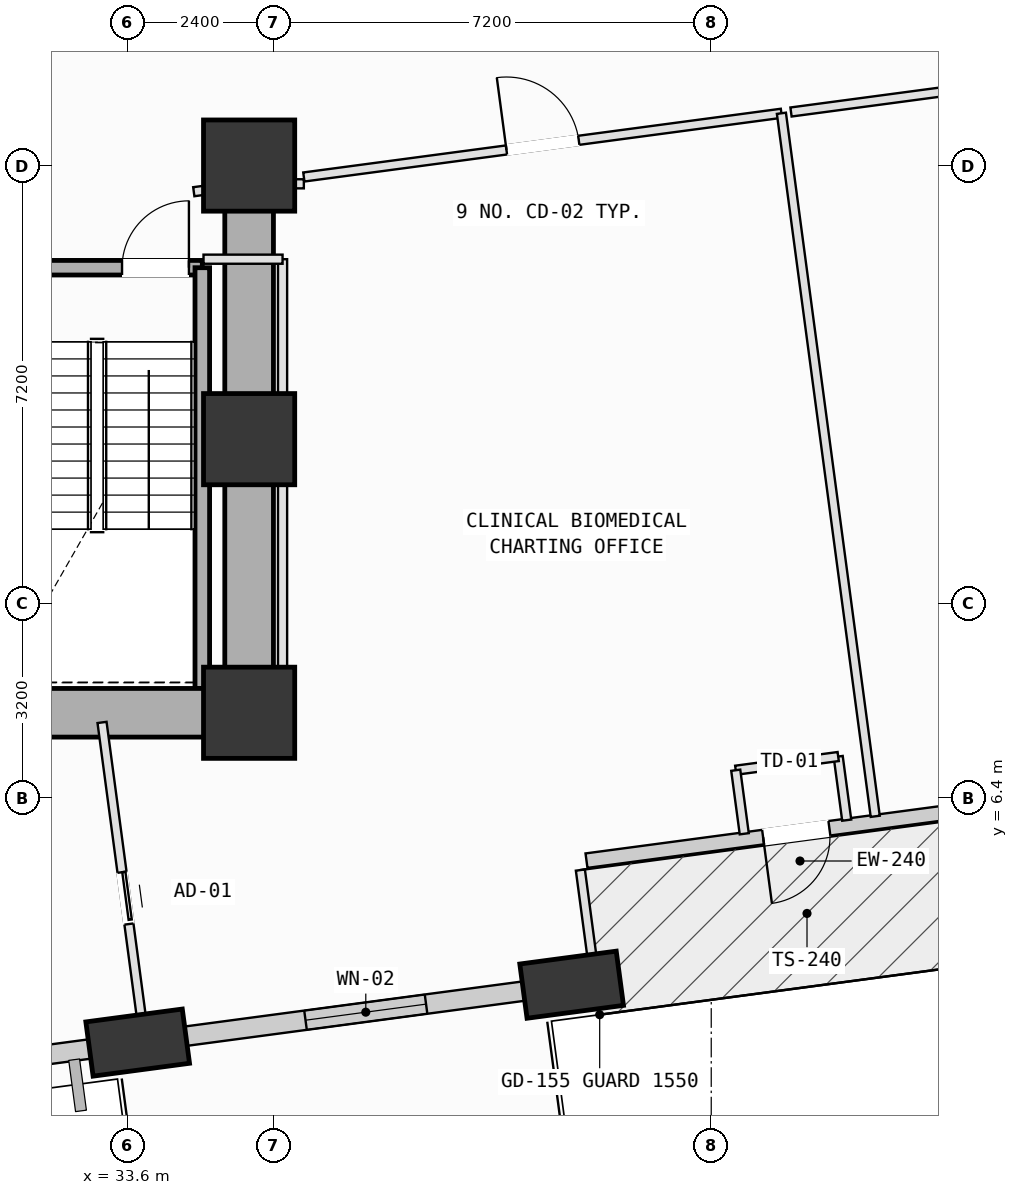
"""IFC4 building model, lengths in metres.
Left out: names, types, materials, properties, quantities, classifications, styles, units other than length and angle.
Written with IfcOpenShell. Run it as: python <this file> out.ifc"""

import sys

from ifc_helpers import new_model, si_unit, direction, frame, frame_2d, origin, origin_2d, place, context, subcontext, project, spatial, rectangle, extrude, element, fill, save


model = new_model("IFC4")
c1 = context("Model", 3, precision=1e-05, world=origin(), true_north=direction((0.0, 1.0)))
c2 = subcontext(c1, "Body", "Model", "MODEL_VIEW")
j1 = project(units=[si_unit("LENGTHUNIT", "METRE"), si_unit("PLANEANGLEUNIT", "RADIAN")], contexts=[c1])
p1 = place(None, origin())
s1 = spatial("IfcSite", under=j1, at=p1, CompositionType="ELEMENT")
p2 = place(p1, origin())
s2 = spatial("IfcBuilding", under=s1, at=p2, CompositionType="ELEMENT")
p3 = place(p2, frame((0.0, 0.0, 55.0)))
s3 = spatial("IfcBuildingStorey", under=s2, at=p3, CompositionType="ELEMENT", Elevation=55.0)
for number, where, z_axis, x_axis in (
    (1, (35.6, 7.8, 0.0), (0.0, 0.0, 1.0), (1.0, 0.0, 0.0)),
    (2, (35.6, 12.3, 0.0), (0.0, 0.0, 1.0), (1.0, 0.0, 0.0)),
    (3, (35.6, 16.8, 0.0), (0.0, 0.0, 1.0), (1.0, 0.0, 0.0)),
):
    element("IfcColumn", number, at=place(p3, frame(where, z_axis=z_axis, x_axis=x_axis)), inside=s3, PredefinedType="COLUMN", context=c2, shape_type="SweptSolid", body=[
        extrude(rectangle(XDim=1.5, YDim=1.5, at=origin_2d()), origin(), (0.0, 0.0, 1.0), 4.0),
    ])
p4 = place(p3, frame((33.768, 2.375, 0.002), z_axis=(0.092515284398, 0.001459807249, 0.995710194341), x_axis=(-0.147311180333, 0.989014492108, 0.012237260689)))
e4 = element("IfcColumn", 4, at=p4, inside=s3, PredefinedType="COLUMN", context=c2, shape_type="SweptSolid", body=[
    extrude(rectangle(XDim=1.6, YDim=0.9, at=origin_2d()), origin(), (0.0, 0.0, 1.0), 4.014),
])
p5 = place(p3, frame((40.904, 3.327, 0.002), z_axis=(0.088309786879, 0.030896261525, 0.995613781828), x_axis=(-0.451622763535, 0.892123181344, 0.012373712677)))
e5 = element("IfcColumn", 5, at=p5, inside=s3, PredefinedType="COLUMN", context=c2, shape_type="SweptSolid", body=[
    extrude(rectangle(XDim=1.6, YDim=0.9, at=origin_2d()), origin(), (0.0, 0.0, 1.0), 4.014),
])
p6 = place(p3, frame((48.047, 6.288, 0.0), z_axis=(0.0, 0.0, 1.0), x_axis=(-0.991216868142, -0.132246437799, 0.0)))
e6 = element("IfcWall", 6, at=p6, inside=s3, PredefinedType="SOLIDWALL", context=c2, shape_type="SweptSolid", body=[
    extrude(rectangle(XDim=6.96, YDim=0.24, at=frame_2d((3.48, 0.0))), origin(), (0.0, 0.0, 1.0), 3.165),
])
p7 = place(p6, frame((2.93, 0.0, 0.0)))
e7 = element("IfcOpeningElement", 7, at=p7, cuts=e6, PredefinedType="OPENING", context=c2, shape_type="SweptSolid", body=[
    extrude(rectangle(XDim=1.1, YDim=2.15, at=frame_2d((0.55, 1.075))), frame((0.0, 0.13, 0.0), z_axis=(0.0, -1.0, 0.0), x_axis=(1.0, 0.0, 0.0)), (0.0, 0.0, 1.0), 0.26),
])
p8 = place(p3, frame((33.348, 2.319, 0.0), z_axis=(0.0, 0.0, 1.0), x_axis=(-0.991219354878, -0.132227797813, 0.0)))
e8 = element("IfcWall", 8, at=p8, inside=s3, PredefinedType="SOLIDWALL", context=c2, shape_type="SweptSolid", body=[
    extrude(rectangle(XDim=5.99, YDim=0.32, at=frame_2d((2.995, 0.0))), origin(), (0.0, 0.0, 1.0), 3.165),
])
p9 = place(p8, frame((2.194, 0.0, 0.75)))
e9 = element("IfcOpeningElement", 9, at=p9, cuts=e8, PredefinedType="OPENING", context=c2, shape_type="SweptSolid", body=[
    extrude(rectangle(XDim=1.6, YDim=1.95, at=frame_2d((0.8, 0.975))), frame((0.0, 0.17, 0.0), z_axis=(0.0, -1.0, 0.0), x_axis=(1.0, 0.0, 0.0)), (0.0, 0.0, 1.0), 0.34),
])
p10 = place(p3, frame((40.485, 3.271, 0.0), z_axis=(0.0, 0.0, 1.0), x_axis=(-0.991217209888, -0.132243876315, 0.0)))
e10 = element("IfcWall", 10, at=p10, inside=s3, PredefinedType="SOLIDWALL", context=c2, shape_type="SweptSolid", body=[
    extrude(rectangle(XDim=5.985, YDim=0.32, at=frame_2d((2.993, 0.0))), origin(), (0.0, 0.0, 1.0), 3.165),
])
p11 = place(p10, frame((1.993, 0.0, 0.75)))
e11 = element("IfcOpeningElement", 11, at=p11, cuts=e10, PredefinedType="OPENING", context=c2, shape_type="SweptSolid", body=[
    extrude(rectangle(XDim=2.0, YDim=1.95, at=frame_2d((1.0, 0.975))), frame((0.0, 0.17, 0.0), z_axis=(0.0, -1.0, 0.0), x_axis=(1.0, 0.0, 0.0)), (0.0, 0.0, 1.0), 0.34),
])
p12 = place(p3, frame((31.37, 15.12, 0.0), z_axis=(0.0, 0.0, 1.0), x_axis=(1.0, 0.0, 0.0)))
e12 = element("IfcWall", 12, at=p12, inside=s3, PredefinedType="SOLIDWALL", context=c2, shape_type="SweptSolid", body=[
    extrude(rectangle(XDim=3.46, YDim=0.24, at=frame_2d((1.73, 0.0))), origin(), (0.0, 0.0, 1.0), 3.78),
])
p13 = place(p12, frame((2.14, 0.0, 0.0)))
e13 = element("IfcOpeningElement", 13, at=p13, cuts=e12, PredefinedType="OPENING", context=c2, shape_type="SweptSolid", body=[
    extrude(rectangle(XDim=1.1, YDim=2.15, at=frame_2d((0.55, 1.075))), frame((0.0, 0.13, 0.0), z_axis=(0.0, -1.0, 0.0), x_axis=(1.0, 0.0, 0.0)), (0.0, 0.0, 1.0), 0.26),
])
p14 = place(p3, frame((34.83, 15.12, 0.0), z_axis=(0.0, 0.0, 1.0), x_axis=(0.0, -1.0, 0.0)))
e14 = element("IfcWall", 14, at=p14, inside=s3, PredefinedType="SOLIDWALL", context=c2, shape_type="SweptSolid", body=[
    extrude(rectangle(XDim=6.92, YDim=0.24, at=frame_2d((3.46, 0.0))), origin(), (0.0, 0.0, 1.0), 3.78),
])
p15 = place(p3, frame((24.8, 7.8, 0.0), z_axis=(0.0, 0.0, 1.0), x_axis=(1.0, 0.0, 0.0)))
e15 = element("IfcWall", 15, at=p15, inside=s3, PredefinedType="SHEAR", context=c2, shape_type="SweptSolid", body=[
    extrude(rectangle(XDim=10.8, YDim=0.8, at=frame_2d((5.4, 0.0))), origin(), (0.0, 0.0, 1.0), 3.78),
])
p16 = place(p3, frame((35.6, 7.8, 0.0), z_axis=(0.0, 0.0, 1.0), x_axis=(0.0, 1.0, 0.0)))
e16 = element("IfcWall", 16, at=p16, inside=s3, PredefinedType="SHEAR", context=c2, shape_type="SweptSolid", body=[
    extrude(rectangle(XDim=9.0, YDim=0.8, at=frame_2d((4.5, 0.0))), origin(), (0.0, 0.0, 1.0), 3.78),
])
p17 = place(p3, frame((33.912, 2.162, 0.0), z_axis=(0.0, 0.0, 1.0), x_axis=(-0.991239788313, -0.132074532234, 0.0)))
e17 = element("IfcWall", 17, at=p17, inside=s3, PredefinedType="PARTITIONING", context=c2, shape_type="SweptSolid", body=[
    extrude(rectangle(XDim=0.538, YDim=0.15, at=frame_2d((0.269, 0.0))), origin(), (0.0, 0.0, 1.0), 3.165),
])
p18 = place(p3, frame((33.181, 7.641, 0.0), z_axis=(0.0, 0.0, 1.0), x_axis=(0.132282335523, -0.991212078068, 0.0)))
e18 = element("IfcWall", 18, at=p18, inside=s3, PredefinedType="PARTITIONING", context=c2, shape_type="SweptSolid", body=[
    extrude(rectangle(XDim=5.528, YDim=0.15, at=frame_2d((2.764, 0.0))), origin(), (0.0, 0.0, 1.0), 3.78),
])
p19 = place(p18, frame((2.485, 0.0, 0.0)))
e19 = element("IfcOpeningElement", 19, at=p19, cuts=e18, PredefinedType="OPENING", context=c2, shape_type="SweptSolid", body=[
    extrude(rectangle(XDim=0.86, YDim=2.06, at=frame_2d((0.43, 1.03))), frame((0.0, 0.085, 0.0), z_axis=(0.0, -1.0, 0.0), x_axis=(1.0, 0.0, 0.0)), (0.0, 0.0, 1.0), 0.17),
])
p20 = place(p3, frame((35.6, 7.5, 0.0), z_axis=(0.0, 0.0, 1.0), x_axis=(1.0, 0.0, 0.0)))
e20 = element("IfcWall", 20, at=p20, inside=s3, PredefinedType="PARTITIONING", context=c2, shape_type="SweptSolid", body=[
    extrude(rectangle(XDim=0.55, YDim=0.15, at=frame_2d((0.275, 0.0))), origin(), (0.0, 0.0, 1.0), 3.78),
])
p21 = place(p3, frame((36.15, 7.5, 0.0), z_axis=(0.0, 0.0, 1.0), x_axis=(0.0, 1.0, 0.0)))
e21 = element("IfcWall", 21, at=p21, inside=s3, PredefinedType="PARTITIONING", context=c2, shape_type="SweptSolid", body=[
    extrude(rectangle(XDim=7.76, YDim=0.15, at=frame_2d((3.88, 0.0))), origin(), (0.0, 0.0, 1.0), 3.78),
])
p22 = place(p3, frame((36.15, 15.26, 0.0), z_axis=(0.0, 0.0, 1.0), x_axis=(-1.0, 0.0, 0.0)))
e22 = element("IfcWall", 22, at=p22, inside=s3, PredefinedType="PARTITIONING", context=c2, shape_type="SweptSolid", body=[
    extrude(rectangle(XDim=1.3, YDim=0.15, at=frame_2d((0.65, 0.0))), origin(), (0.0, 0.0, 1.0), 3.78),
])
p23 = place(p3, frame((34.69, 16.37, 0.0), z_axis=(0.0, 0.0, 1.0), x_axis=(0.991210517586, 0.132294027937, 0.0)))
e23 = element("IfcWall", 23, at=p23, inside=s3, PredefinedType="PARTITIONING", context=c2, shape_type="SweptSolid", body=[
    extrude(rectangle(XDim=0.982, YDim=0.15, at=frame_2d((0.491, 0.0))), origin(), (0.0, 0.0, 1.0), 2.865),
])
p24 = place(p3, frame((35.663, 16.5, 0.0), z_axis=(0.0, 0.0, 1.0), x_axis=(1.0, 0.0, 0.0)))
e24 = element("IfcWall", 24, at=p24, inside=s3, PredefinedType="PARTITIONING", context=c2, shape_type="SweptSolid", body=[
    extrude(rectangle(XDim=0.837, YDim=0.15, at=frame_2d((0.418, 0.0))), origin(), (0.0, 0.0, 1.0), 2.865),
])
p25 = place(p3, frame((36.5, 16.612, 0.0), z_axis=(0.0, 0.0, 1.0), x_axis=(0.991217133431, 0.132244449384, 0.0)))
e25 = element("IfcWall", 25, at=p25, inside=s3, PredefinedType="PARTITIONING", context=c2, shape_type="SweptSolid", body=[
    extrude(rectangle(XDim=7.924, YDim=0.15, at=frame_2d((3.962, 0.0))), origin(), (0.0, 0.0, 1.0), 3.78),
])
p26 = place(p25, frame((3.362, 0.0, 0.0)))
e26 = element("IfcOpeningElement", 26, at=p26, cuts=e25, PredefinedType="OPENING", context=c2, shape_type="SweptSolid", body=[
    extrude(rectangle(XDim=1.2, YDim=2.15, at=frame_2d((0.6, 1.075))), frame((0.0, 0.085, 0.0), z_axis=(0.0, -1.0, 0.0), x_axis=(1.0, 0.0, 0.0)), (0.0, 0.0, 1.0), 0.17),
])
p27 = place(p3, frame((44.354, 17.66, 0.0), z_axis=(0.0, 0.0, 1.0), x_axis=(0.132267904737, -0.991214003824, 0.0)))
e27 = element("IfcWall", 27, at=p27, inside=s3, PredefinedType="PARTITIONING", context=c2, shape_type="SweptSolid", body=[
    extrude(rectangle(XDim=11.666, YDim=0.15, at=frame_2d((5.833, 0.0))), origin(), (0.0, 0.0, 1.0), 3.78),
])
p28 = place(p3, frame((45.428, 6.034, 0.0), z_axis=(0.0, 0.0, 1.0), x_axis=(-0.132542498532, 0.991177323229, 0.0)))
e28 = element("IfcWall", 28, at=p28, inside=s3, PredefinedType="PARTITIONING", context=c2, shape_type="SweptSolid", body=[
    extrude(rectangle(XDim=1.055, YDim=0.15, at=frame_2d((0.528, 0.0))), origin(), (0.0, 0.0, 1.0), 3.78),
])
p29 = place(p3, frame((45.288, 7.08, 0.0), z_axis=(0.0, 0.0, 1.0), x_axis=(-0.99119526041, -0.132408291814, 0.0)))
e29 = element("IfcWall", 29, at=p29, inside=s3, PredefinedType="PARTITIONING", context=c2, shape_type="SweptSolid", body=[
    extrude(rectangle(XDim=1.7, YDim=0.15, at=frame_2d((0.85, 0.0))), origin(), (0.0, 0.0, 1.0), 3.78),
])
p30 = place(p3, frame((43.603, 6.855, 0.0), z_axis=(0.0, 0.0, 1.0), x_axis=(0.132694613072, -0.991156970243, 0.0)))
e30 = element("IfcWall", 30, at=p30, inside=s3, PredefinedType="PARTITIONING", context=c2, shape_type="SweptSolid", body=[
    extrude(rectangle(XDim=1.054, YDim=0.15, at=frame_2d((0.527, 0.0))), origin(), (0.0, 0.0, 1.0), 3.78),
])
p31 = place(p3, frame((41.048, 5.213, 0.0), z_axis=(0.0, 0.0, 1.0), x_axis=(0.132148345288, -0.991229950535, 0.0)))
e31 = element("IfcWall", 31, at=p31, inside=s3, PredefinedType="PARTITIONING", context=c2, shape_type="SweptSolid", body=[
    extrude(rectangle(XDim=2.08, YDim=0.15, at=frame_2d((1.04, 0.0))), origin(), (0.0, 0.0, 1.0), 3.78),
])
p32 = place(p3, frame((41.323, 3.151, 0.0), z_axis=(0.0, 0.0, 1.0), x_axis=(-0.991175438227, -0.132556594159, 0.0)))
e32 = element("IfcWall", 32, at=p32, inside=s3, PredefinedType="PARTITIONING", context=c2, shape_type="SweptSolid", body=[
    extrude(rectangle(XDim=0.814, YDim=0.15, at=frame_2d((0.407, 0.0))), origin(), (0.0, 0.0, 1.0), 3.145),
])
p33 = place(p3, frame((34.583, 2.252, 0.0), z_axis=(0.0, 0.0, 1.0), x_axis=(-0.991359278326, -0.131174621311, 0.0)))
e33 = element("IfcWall", 33, at=p33, inside=s3, PredefinedType="PARTITIONING", context=c2, shape_type="SweptSolid", body=[
    extrude(rectangle(XDim=0.517, YDim=0.15, at=frame_2d((0.259, 0.0))), origin(), (0.0, 0.0, 1.0), 3.165),
])
p34 = place(p3, frame((44.512, 17.681, 0.0), z_axis=(0.0, 0.0, 1.0), x_axis=(0.991212913697, 0.13227607388, 0.0)))
e34 = element("IfcWall", 34, at=p34, inside=s3, PredefinedType="PARTITIONING", context=c2, shape_type="SweptSolid", body=[
    extrude(rectangle(XDim=12.241, YDim=0.15, at=frame_2d((6.12, 0.0))), origin(), (0.0, 0.0, 1.0), 3.78),
])
p35 = place(p34, frame((5.52, 0.0, 0.0)))
e35 = element("IfcOpeningElement", 35, at=p35, cuts=e34, PredefinedType="OPENING", context=c2, shape_type="SweptSolid", body=[
    extrude(rectangle(XDim=1.2, YDim=2.15, at=frame_2d((0.6, 1.075))), frame((0.0, 0.085, 0.0), z_axis=(0.0, -1.0, 0.0), x_axis=(1.0, 0.0, 0.0)), (0.0, 0.0, 1.0), 0.17),
])
p36 = place(p7, origin())
e36 = element("IfcDoor", 36, at=p36, inside=s3, OperationType="SINGLE_SWING_RIGHT", PredefinedType="DOOR", context=c2, shape_type="SweptSolid", body=[
    extrude(rectangle(XDim=1.1, YDim=2.15, at=frame_2d((0.55, 1.075))), frame((0.0, 0.025, 0.0), z_axis=(0.0, -1.0, 0.0), x_axis=(1.0, 0.0, 0.0)), (0.0, 0.0, 1.0), 0.05),
])
fill(e7, e36)
p37 = place(p11, origin())
e37 = element("IfcWindow", 37, at=p37, inside=s3, PartitioningType="SINGLE_PANEL", PredefinedType="WINDOW", context=c2, shape_type="SweptSolid", body=[
    extrude(rectangle(XDim=2.0, YDim=1.95, at=frame_2d((1.0, 0.975))), frame((0.0, 0.03, 0.0), z_axis=(0.0, -1.0, 0.0), x_axis=(1.0, 0.0, 0.0)), (0.0, 0.0, 1.0), 0.06),
])
fill(e11, e37)
p38 = place(p13, origin())
e38 = element("IfcDoor", 38, at=p38, inside=s3, OperationType="SINGLE_SWING_RIGHT", PredefinedType="DOOR", context=c2, shape_type="SweptSolid", body=[
    extrude(rectangle(XDim=1.1, YDim=2.15, at=frame_2d((0.55, 1.075))), frame((0.0, 0.025, 0.0), z_axis=(0.0, -1.0, 0.0), x_axis=(1.0, 0.0, 0.0)), (0.0, 0.0, 1.0), 0.05),
])
fill(e13, e38)
p39 = place(p26, origin())
e39 = element("IfcDoor", 39, at=p39, inside=s3, OperationType="SINGLE_SWING_LEFT", PredefinedType="DOOR", context=c2, shape_type="SweptSolid", body=[
    extrude(rectangle(XDim=1.2, YDim=2.15, at=frame_2d((0.6, 1.075))), frame((0.0, 0.025, 0.0), z_axis=(0.0, -1.0, 0.0), x_axis=(1.0, 0.0, 0.0)), (0.0, 0.0, 1.0), 0.05),
])
fill(e26, e39)
p40 = place(p19, origin())
e40 = element("IfcDoor", 40, at=p40, inside=s3, OperationType="SLIDING_TO_LEFT", PredefinedType="DOOR", context=c2, shape_type="SweptSolid", body=[
    extrude(rectangle(XDim=0.86, YDim=2.06, at=frame_2d((0.43, 1.03))), frame((0.0, 0.025, 0.0), z_axis=(0.0, -1.0, 0.0), x_axis=(1.0, 0.0, 0.0)), (0.0, 0.0, 1.0), 0.05),
])
fill(e19, e40)
save(model, sys.argv[1])
